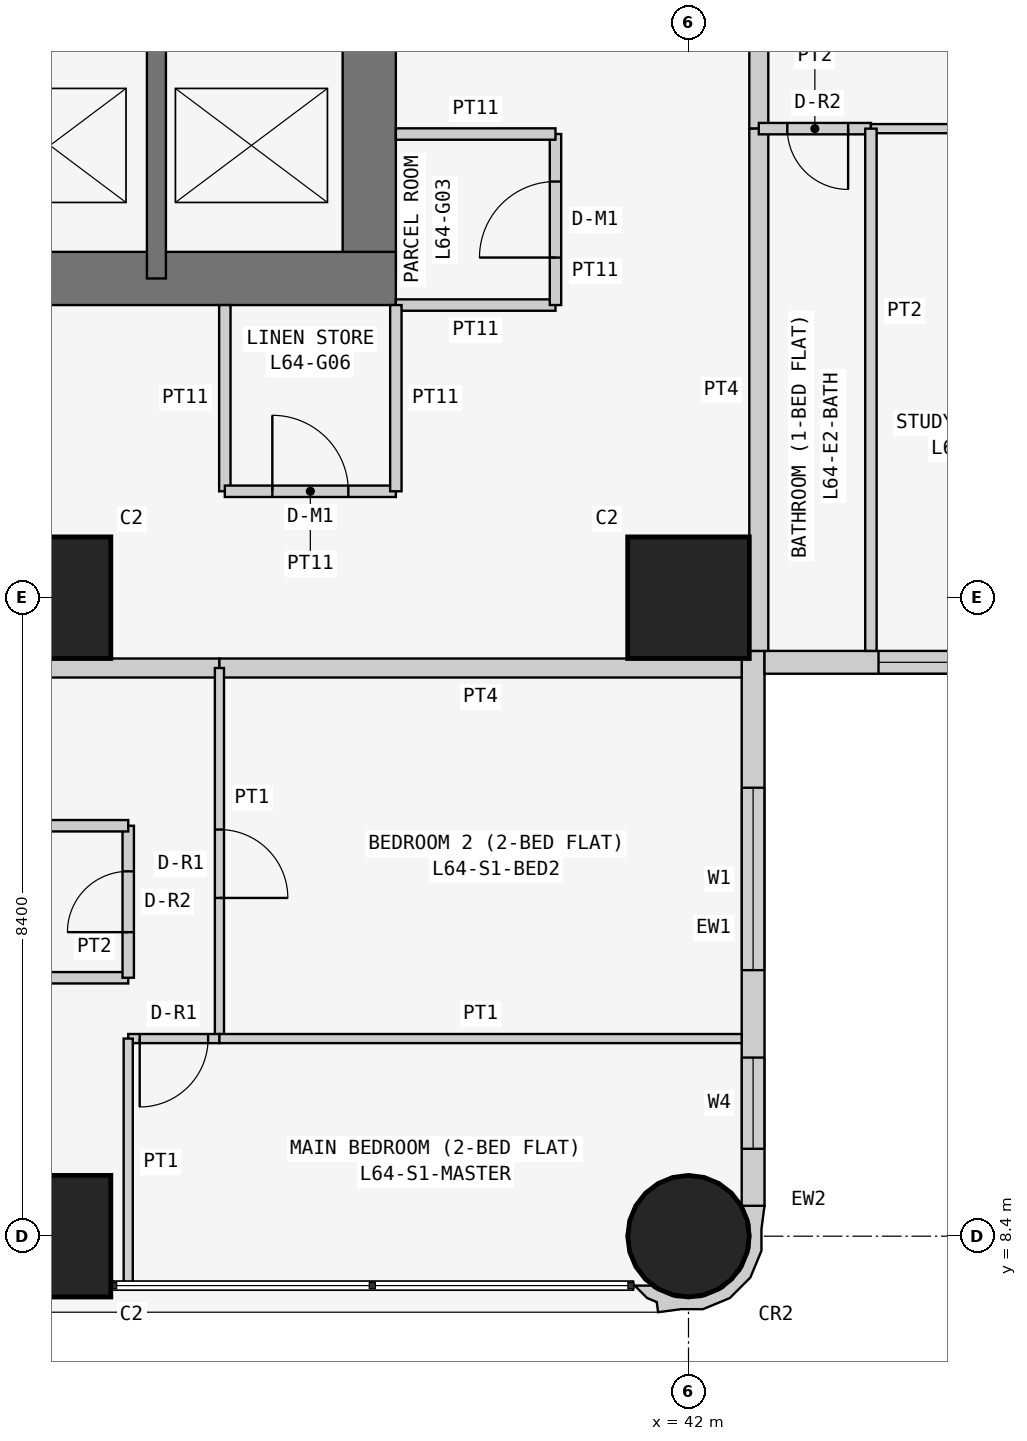
"""IFC4 building model, lengths in metres.
Left out: names, types, materials, properties, quantities, classifications, styles, units other than length and angle.
Written with IfcOpenShell. Run it as: python <this file> out.ifc"""

import sys

from ifc_helpers import new_model, si_unit, direction, frame, frame_2d, origin, origin_2d, place, context, subcontext, project, spatial, polyline, rectangle, circle, outline, extrude, element, fill, save


model = new_model("IFC4")
c1 = context("Model", 3, precision=1e-05, world=origin(), true_north=direction((0.0, 1.0)))
c2 = subcontext(c1, "Body", "Model", "MODEL_VIEW")
j1 = project(units=[si_unit("LENGTHUNIT", "METRE"), si_unit("PLANEANGLEUNIT", "RADIAN")], contexts=[c1])
p1 = place(None, origin())
s1 = spatial("IfcSite", under=j1, at=p1, CompositionType="ELEMENT")
p2 = place(p1, origin())
s2 = spatial("IfcBuilding", under=s1, at=p2, CompositionType="ELEMENT")
p3 = place(p2, frame((0.0, 0.0, 244.5)))
s3 = spatial("IfcBuildingStorey", under=s2, at=p3, CompositionType="ELEMENT", Elevation=244.5)
for number, where, z_axis, x_axis in (
    (1, (33.6, 8.4, 0.0), (0.0, 0.0, 1.0), (1.0, 0.0, 0.0)),
    (2, (33.6, 16.8, 0.0), (0.0, 0.0, 1.0), (1.0, 0.0, 0.0)),
):
    element("IfcColumn", number, at=place(p3, frame(where, z_axis=z_axis, x_axis=x_axis)), inside=s3, PredefinedType="COLUMN", context=c2, shape_type="SweptSolid", body=[
        extrude(rectangle(XDim=1.6, YDim=1.6, at=origin_2d()), origin(), (0.0, 0.0, 1.0), 3.6),
    ])
p4 = place(p3, frame((42.0, 8.4, 0.0), z_axis=(0.0, 0.0, 1.0), x_axis=(1.0, 0.0, 0.0)))
e3 = element("IfcColumn", 3, at=p4, inside=s3, PredefinedType="COLUMN", context=c2, shape_type="SweptSolid", body=[
    extrude(circle(Radius=0.8, at=origin_2d()), origin(), (0.0, 0.0, 1.0), 3.6),
])
p5 = place(p3, frame((42.0, 16.8, 0.0), z_axis=(0.0, 0.0, 1.0), x_axis=(1.0, 0.0, 0.0)))
e4 = element("IfcColumn", 4, at=p5, inside=s3, PredefinedType="COLUMN", context=c2, shape_type="SweptSolid", body=[
    extrude(rectangle(XDim=1.6, YDim=1.6, at=origin_2d()), origin(), (0.0, 0.0, 1.0), 3.6),
])
p6 = place(p3, frame((21.0, 21.0, 0.0), z_axis=(0.0, 0.0, 1.0), x_axis=(1.0, 0.0, 0.0)))
e5 = element("IfcWall", 5, at=p6, inside=s3, PredefinedType="SHEAR", context=c2, shape_type="SweptSolid", body=[
    extrude(rectangle(XDim=17.15, YDim=0.7, at=frame_2d((8.575, 0.0))), origin(), (0.0, 0.0, 1.0), 3.6),
])
p7 = place(p3, frame((37.8, 21.0, 0.0), z_axis=(0.0, 0.0, 1.0), x_axis=(0.0, 1.0, 0.0)))
e6 = element("IfcWall", 6, at=p7, inside=s3, PredefinedType="SHEAR", context=c2, shape_type="SweptSolid", body=[
    extrude(rectangle(XDim=17.15, YDim=0.7, at=frame_2d((8.575, 0.0))), origin(), (0.0, 0.0, 1.0), 3.6),
])
p8 = place(p7, frame((5.2, 0.0, 0.0)))
e7 = element("IfcOpeningElement", 7, at=p8, cuts=e6, PredefinedType="OPENING", context=c2, shape_type="SweptSolid", body=[
    extrude(rectangle(XDim=1.2, YDim=2.1, at=frame_2d((0.6, 1.05))), frame((0.0, 0.36, 0.0), z_axis=(0.0, -1.0, 0.0), x_axis=(1.0, 0.0, 0.0)), (0.0, 0.0, 1.0), 0.72),
])
p9 = place(p3, frame((35.0, 21.0, 0.0), z_axis=(0.0, 0.0, 1.0), x_axis=(0.0, 1.0, 0.0)))
e8 = element("IfcWall", 8, at=p9, inside=s3, PredefinedType="SHEAR", context=c2, shape_type="SweptSolid", body=[
    extrude(rectangle(XDim=3.2, YDim=0.25, at=frame_2d((1.6, 0.0))), origin(), (0.0, 0.0, 1.0), 3.6),
])
p10 = place(p3, frame((42.85, 8.8, 0.0), z_axis=(0.0, 0.0, 1.0), x_axis=(0.0, 1.0, 0.0)))
e9 = element("IfcWall", 9, at=p10, inside=s3, PredefinedType="SOLIDWALL", context=c2, shape_type="SweptSolid", body=[
    extrude(rectangle(XDim=7.3, YDim=0.3, at=frame_2d((3.65, 0.0))), origin(), (0.0, 0.0, 1.0), 3.35),
])
p11 = place(p10, frame((3.1, 0.0, 0.9)))
e10 = element("IfcOpeningElement", 10, at=p11, cuts=e9, PredefinedType="OPENING", context=c2, shape_type="SweptSolid", body=[
    extrude(rectangle(XDim=2.4, YDim=1.5, at=frame_2d((1.2, 0.75))), frame((0.0, 0.16, 0.0), z_axis=(0.0, -1.0, 0.0), x_axis=(1.0, 0.0, 0.0)), (0.0, 0.0, 1.0), 0.32),
])
p12 = place(p10, frame((0.75, 0.0, 0.9)))
e11 = element("IfcOpeningElement", 11, at=p12, cuts=e9, PredefinedType="OPENING", context=c2, shape_type="SweptSolid", body=[
    extrude(rectangle(XDim=1.2, YDim=1.5, at=frame_2d((0.6, 0.75))), frame((0.0, 0.16, 0.0), z_axis=(0.0, -1.0, 0.0), x_axis=(1.0, 0.0, 0.0)), (0.0, 0.0, 1.0), 0.32),
])
p13 = place(p3, frame((43.0, 15.95, 0.0), z_axis=(0.0, 0.0, 1.0), x_axis=(1.0, 0.0, 0.0)))
e12 = element("IfcWall", 12, at=p13, inside=s3, PredefinedType="SOLIDWALL", context=c2, shape_type="SweptSolid", body=[
    extrude(rectangle(XDim=7.0, YDim=0.3, at=frame_2d((3.5, 0.0))), origin(), (0.0, 0.0, 1.0), 3.35),
])
p14 = place(p13, frame((1.5, 0.0, 0.9)))
e13 = element("IfcOpeningElement", 13, at=p14, cuts=e12, PredefinedType="OPENING", context=c2, shape_type="SweptSolid", body=[
    extrude(rectangle(XDim=2.4, YDim=1.5, at=frame_2d((1.2, 0.75))), frame((0.0, 0.16, 0.0), z_axis=(0.0, -1.0, 0.0), x_axis=(1.0, 0.0, 0.0)), (0.0, 0.0, 1.0), 0.32),
])
p15 = place(p13, frame((5.05, 0.0, 0.9)))
e14 = element("IfcOpeningElement", 14, at=p15, cuts=e12, PredefinedType="OPENING", context=c2, shape_type="SweptSolid", body=[
    extrude(rectangle(XDim=1.2, YDim=1.5, at=frame_2d((0.6, 0.75))), frame((0.0, 0.16, 0.0), z_axis=(0.0, -1.0, 0.0), x_axis=(1.0, 0.0, 0.0)), (0.0, 0.0, 1.0), 0.32),
])
p16 = place(p3, frame((41.352, 7.805, 0.0), z_axis=(0.0, 0.0, 1.0), x_axis=(0.343276641956, -0.93923434088, 0.0)))
e15 = element("IfcWall", 15, at=p16, inside=s3, PredefinedType="SOLIDWALL", context=c2, shape_type="SweptSolid", body=[
    extrude(outline(polyline([(-0.369, 1.89), (-0.509, 1.621), (-0.49, 1.615), (-0.479, 1.609), (-0.211, 1.62), (0.088, 1.511), (0.323, 1.295), (0.457, 1.006), (0.47, 0.688), (0.361, 0.389), (0.145, 0.154), (0.108, 0.136), (0.031, -0.075), (0.241, 0.023), (0.333, 0.124), (0.465, 0.094), (0.532, 0.393), (0.631, 0.663), (0.614, 1.044), (0.453, 1.391), (0.172, 1.649), (-0.097, 1.748), (-0.369, 1.89)])), origin(), (0.0, 0.0, 1.0), 3.35),
])
p17 = place(p3, frame((38.15, 20.65, 0.0), z_axis=(0.0, 0.0, 1.0), x_axis=(1.0, 0.0, 0.0)))
e16 = element("IfcWall", 16, at=p17, inside=s3, PredefinedType="PARTITIONING", context=c2, shape_type="SweptSolid", body=[
    extrude(rectangle(XDim=2.1, YDim=0.15, at=frame_2d((1.05, 0.0))), origin(), (0.0, 0.0, 1.0), 3.35),
])
p18 = place(p3, frame((40.25, 20.65, 0.0), z_axis=(0.0, 0.0, 1.0), x_axis=(0.0, 1.0, 0.0)))
e17 = element("IfcWall", 17, at=p18, inside=s3, PredefinedType="PARTITIONING", context=c2, shape_type="SweptSolid", body=[
    extrude(rectangle(XDim=2.25, YDim=0.15, at=frame_2d((1.125, 0.0))), origin(), (0.0, 0.0, 1.0), 3.35),
])
p19 = place(p18, frame((0.625, 0.0, 0.0)))
e18 = element("IfcOpeningElement", 18, at=p19, cuts=e17, PredefinedType="OPENING", context=c2, shape_type="SweptSolid", body=[
    extrude(rectangle(XDim=1.0, YDim=2.1, at=frame_2d((0.5, 1.05))), frame((0.0, 0.085, 0.0), z_axis=(0.0, -1.0, 0.0), x_axis=(1.0, 0.0, 0.0)), (0.0, 0.0, 1.0), 0.17),
])
p20 = place(p3, frame((40.25, 22.9, 0.0), z_axis=(0.0, 0.0, 1.0), x_axis=(-1.0, 0.0, 0.0)))
e19 = element("IfcWall", 19, at=p20, inside=s3, PredefinedType="PARTITIONING", context=c2, shape_type="SweptSolid", body=[
    extrude(rectangle(XDim=2.1, YDim=0.15, at=frame_2d((1.05, 0.0))), origin(), (0.0, 0.0, 1.0), 3.35),
])
p21 = place(p3, frame((35.9, 20.65, 0.0), z_axis=(0.0, 0.0, 1.0), x_axis=(0.0, -1.0, 0.0)))
e20 = element("IfcWall", 20, at=p21, inside=s3, PredefinedType="PARTITIONING", context=c2, shape_type="SweptSolid", body=[
    extrude(rectangle(XDim=2.45, YDim=0.15, at=frame_2d((1.225, 0.0))), origin(), (0.0, 0.0, 1.0), 3.35),
])
p22 = place(p3, frame((35.9, 18.2, 0.0), z_axis=(0.0, 0.0, 1.0), x_axis=(1.0, 0.0, 0.0)))
e21 = element("IfcWall", 21, at=p22, inside=s3, PredefinedType="PARTITIONING", context=c2, shape_type="SweptSolid", body=[
    extrude(rectangle(XDim=2.25, YDim=0.15, at=frame_2d((1.125, 0.0))), origin(), (0.0, 0.0, 1.0), 3.35),
])
p23 = place(p22, frame((0.625, 0.0, 0.0)))
e22 = element("IfcOpeningElement", 22, at=p23, cuts=e21, PredefinedType="OPENING", context=c2, shape_type="SweptSolid", body=[
    extrude(rectangle(XDim=1.0, YDim=2.1, at=frame_2d((0.5, 1.05))), frame((0.0, 0.085, 0.0), z_axis=(0.0, -1.0, 0.0), x_axis=(1.0, 0.0, 0.0)), (0.0, 0.0, 1.0), 0.17),
])
p24 = place(p3, frame((38.15, 18.2, 0.0), z_axis=(0.0, 0.0, 1.0), x_axis=(0.0, 1.0, 0.0)))
e23 = element("IfcWall", 23, at=p24, inside=s3, PredefinedType="PARTITIONING", context=c2, shape_type="SweptSolid", body=[
    extrude(rectangle(XDim=2.45, YDim=0.15, at=frame_2d((1.225, 0.0))), origin(), (0.0, 0.0, 1.0), 3.35),
])
p25 = place(p3, frame((42.925, 29.4, 0.0), z_axis=(0.0, 0.0, 1.0), x_axis=(0.0, -1.0, 0.0)))
e24 = element("IfcWall", 24, at=p25, inside=s3, PredefinedType="PARTITIONING", context=c2, shape_type="SweptSolid", body=[
    extrude(rectangle(XDim=6.429, YDim=0.25, at=frame_2d((3.214, 0.0))), origin(), (0.0, 0.0, 1.0), 3.35),
])
p26 = place(p25, frame((0.5, 0.0, 0.0)))
e25 = element("IfcOpeningElement", 25, at=p26, cuts=e24, PredefinedType="OPENING", context=c2, shape_type="SweptSolid", body=[
    extrude(rectangle(XDim=1.0, YDim=2.1, at=frame_2d((0.5, 1.05))), frame((0.0, 0.135, 0.0), z_axis=(0.0, -1.0, 0.0), x_axis=(1.0, 0.0, 0.0)), (0.0, 0.0, 1.0), 0.27),
])
p27 = place(p3, frame((42.925, 22.971, 0.0), z_axis=(0.0, 0.0, 1.0), x_axis=(0.0, -1.0, 0.0)))
e26 = element("IfcWall", 26, at=p27, inside=s3, PredefinedType="PARTITIONING", context=c2, shape_type="SweptSolid", body=[
    extrude(rectangle(XDim=6.871, YDim=0.25, at=frame_2d((3.436, 0.0))), origin(), (0.0, 0.0, 1.0), 3.35),
])
p28 = place(p3, frame((35.829, 15.875, 0.0), z_axis=(0.0, 0.0, 1.0), x_axis=(-1.0, 0.0, 0.0)))
e27 = element("IfcWall", 27, at=p28, inside=s3, PredefinedType="PARTITIONING", context=c2, shape_type="SweptSolid", body=[
    extrude(rectangle(XDim=6.429, YDim=0.25, at=frame_2d((3.215, 0.0))), origin(), (0.0, 0.0, 1.0), 3.35),
])
p29 = place(p28, frame((4.929, 0.0, 0.0)))
e28 = element("IfcOpeningElement", 28, at=p29, cuts=e27, PredefinedType="OPENING", context=c2, shape_type="SweptSolid", body=[
    extrude(rectangle(XDim=1.0, YDim=2.1, at=frame_2d((0.5, 1.05))), frame((0.0, 0.135, 0.0), z_axis=(0.0, -1.0, 0.0), x_axis=(1.0, 0.0, 0.0)), (0.0, 0.0, 1.0), 0.27),
])
p30 = place(p3, frame((42.7, 15.875, 0.0), z_axis=(0.0, 0.0, 1.0), x_axis=(-1.0, 0.0, 0.0)))
e29 = element("IfcWall", 29, at=p30, inside=s3, PredefinedType="PARTITIONING", context=c2, shape_type="SweptSolid", body=[
    extrude(rectangle(XDim=6.871, YDim=0.25, at=frame_2d((3.436, 0.0))), origin(), (0.0, 0.0, 1.0), 3.35),
])
p31 = place(p3, frame((44.4, 22.971, 0.0), z_axis=(0.0, 0.0, 1.0), x_axis=(-1.0, 0.0, 0.0)))
e30 = element("IfcWall", 30, at=p31, inside=s3, PredefinedType="PARTITIONING", context=c2, shape_type="SweptSolid", body=[
    extrude(rectangle(XDim=1.475, YDim=0.15, at=frame_2d((0.737, 0.0))), origin(), (0.0, 0.0, 1.0), 3.35),
])
p32 = place(p31, frame((0.3, 0.0, 0.0)))
e31 = element("IfcOpeningElement", 31, at=p32, cuts=e30, PredefinedType="OPENING", context=c2, shape_type="SweptSolid", body=[
    extrude(rectangle(XDim=0.8, YDim=2.1, at=frame_2d((0.4, 1.05))), frame((0.0, 0.085, 0.0), z_axis=(0.0, -1.0, 0.0), x_axis=(1.0, 0.0, 0.0)), (0.0, 0.0, 1.0), 0.17),
])
p33 = place(p3, frame((47.8, 22.971, 0.0), z_axis=(0.0, 0.0, 1.0), x_axis=(-1.0, 0.0, 0.0)))
e32 = element("IfcWall", 32, at=p33, inside=s3, PredefinedType="PARTITIONING", context=c2, shape_type="SweptSolid", body=[
    extrude(rectangle(XDim=3.4, YDim=0.12, at=frame_2d((1.7, 0.0))), origin(), (0.0, 0.0, 1.0), 3.35),
])
p34 = place(p33, frame((1.25, 0.0, 0.0)))
e33 = element("IfcOpeningElement", 33, at=p34, cuts=e32, PredefinedType="OPENING", context=c2, shape_type="SweptSolid", body=[
    extrude(rectangle(XDim=0.9, YDim=2.1, at=frame_2d((0.45, 1.05))), frame((0.0, 0.07, 0.0), z_axis=(0.0, -1.0, 0.0), x_axis=(1.0, 0.0, 0.0)), (0.0, 0.0, 1.0), 0.14),
])
p35 = place(p3, frame((44.4, 22.971, 0.0), z_axis=(0.0, 0.0, 1.0), x_axis=(0.0, -1.0, 0.0)))
e34 = element("IfcWall", 34, at=p35, inside=s3, PredefinedType="PARTITIONING", context=c2, shape_type="SweptSolid", body=[
    extrude(rectangle(XDim=6.871, YDim=0.15, at=frame_2d((3.436, 0.0))), origin(), (0.0, 0.0, 1.0), 3.35),
])
p36 = place(p3, frame((29.4, 11.8, 0.0), z_axis=(0.0, 0.0, 1.0), x_axis=(1.0, 0.0, 0.0)))
e35 = element("IfcWall", 35, at=p36, inside=s3, PredefinedType="PARTITIONING", context=c2, shape_type="SweptSolid", body=[
    extrude(rectangle(XDim=5.229, YDim=0.15, at=frame_2d((2.615, 0.0))), origin(), (0.0, 0.0, 1.0), 3.35),
])
p37 = place(p3, frame((34.629, 11.8, 0.0), z_axis=(0.0, 0.0, 1.0), x_axis=(0.0, 1.0, 0.0)))
e36 = element("IfcWall", 36, at=p37, inside=s3, PredefinedType="PARTITIONING", context=c2, shape_type="SweptSolid", body=[
    extrude(rectangle(XDim=2.0, YDim=0.15, at=frame_2d((1.0, 0.0))), origin(), (0.0, 0.0, 1.0), 3.35),
])
p38 = place(p37, frame((0.6, 0.0, 0.0)))
e37 = element("IfcOpeningElement", 37, at=p38, cuts=e36, PredefinedType="OPENING", context=c2, shape_type="SweptSolid", body=[
    extrude(rectangle(XDim=0.8, YDim=2.1, at=frame_2d((0.4, 1.05))), frame((0.0, 0.085, 0.0), z_axis=(0.0, -1.0, 0.0), x_axis=(1.0, 0.0, 0.0)), (0.0, 0.0, 1.0), 0.17),
])
p39 = place(p3, frame((34.629, 13.8, 0.0), z_axis=(0.0, 0.0, 1.0), x_axis=(-1.0, 0.0, 0.0)))
e38 = element("IfcWall", 38, at=p39, inside=s3, PredefinedType="PARTITIONING", context=c2, shape_type="SweptSolid", body=[
    extrude(rectangle(XDim=5.229, YDim=0.15, at=frame_2d((2.615, 0.0))), origin(), (0.0, 0.0, 1.0), 3.35),
])
p40 = place(p3, frame((35.829, 15.875, 0.0), z_axis=(0.0, 0.0, 1.0), x_axis=(0.0, -1.0, 0.0)))
e39 = element("IfcWall", 39, at=p40, inside=s3, PredefinedType="PARTITIONING", context=c2, shape_type="SweptSolid", body=[
    extrude(rectangle(XDim=4.875, YDim=0.12, at=frame_2d((2.438, 0.0))), origin(), (0.0, 0.0, 1.0), 3.35),
])
p41 = place(p40, frame((2.125, 0.0, 0.0)))
e40 = element("IfcOpeningElement", 40, at=p41, cuts=e39, PredefinedType="OPENING", context=c2, shape_type="SweptSolid", body=[
    extrude(rectangle(XDim=0.9, YDim=2.1, at=frame_2d((0.45, 1.05))), frame((0.0, 0.07, 0.0), z_axis=(0.0, -1.0, 0.0), x_axis=(1.0, 0.0, 0.0)), (0.0, 0.0, 1.0), 0.14),
])
p42 = place(p3, frame((35.829, 11.0, 0.0), z_axis=(0.0, 0.0, 1.0), x_axis=(-1.0, 0.0, 0.0)))
e41 = element("IfcWall", 41, at=p42, inside=s3, PredefinedType="PARTITIONING", context=c2, shape_type="SweptSolid", body=[
    extrude(rectangle(XDim=1.2, YDim=0.12, at=frame_2d((0.6, 0.0))), origin(), (0.0, 0.0, 1.0), 3.35),
])
p43 = place(p42, frame((0.149, 0.0, 0.0)))
e42 = element("IfcOpeningElement", 42, at=p43, cuts=e41, PredefinedType="OPENING", context=c2, shape_type="SweptSolid", body=[
    extrude(rectangle(XDim=0.9, YDim=2.1, at=frame_2d((0.45, 1.05))), frame((0.0, 0.07, 0.0), z_axis=(0.0, -1.0, 0.0), x_axis=(1.0, 0.0, 0.0)), (0.0, 0.0, 1.0), 0.14),
])
p44 = place(p3, frame((34.629, 11.0, 0.0), z_axis=(0.0, 0.0, 1.0), x_axis=(0.0, -1.0, 0.0)))
e43 = element("IfcWall", 43, at=p44, inside=s3, PredefinedType="PARTITIONING", context=c2, shape_type="SweptSolid", body=[
    extrude(rectangle(XDim=3.25, YDim=0.12, at=frame_2d((1.625, 0.0))), origin(), (0.0, 0.0, 1.0), 3.35),
])
p45 = place(p3, frame((35.829, 11.0, 0.0), z_axis=(0.0, 0.0, 1.0), x_axis=(1.0, 0.0, 0.0)))
e44 = element("IfcWall", 44, at=p45, inside=s3, PredefinedType="PARTITIONING", context=c2, shape_type="SweptSolid", body=[
    extrude(rectangle(XDim=6.871, YDim=0.12, at=frame_2d((3.436, 0.0))), origin(), (0.0, 0.0, 1.0), 3.35),
])
p46 = place(p14, origin())
e45 = element("IfcWindow", 45, at=p46, inside=s3, PartitioningType="SINGLE_PANEL", PredefinedType="WINDOW", context=c2, shape_type="SweptSolid", body=[
    extrude(rectangle(XDim=2.4, YDim=1.5, at=frame_2d((1.2, 0.75))), frame((0.0, 0.03, 0.0), z_axis=(0.0, -1.0, 0.0), x_axis=(1.0, 0.0, 0.0)), (0.0, 0.0, 1.0), 0.06),
])
fill(e13, e45)
p47 = place(p11, origin())
e46 = element("IfcWindow", 46, at=p47, inside=s3, PartitioningType="SINGLE_PANEL", PredefinedType="WINDOW", context=c2, shape_type="SweptSolid", body=[
    extrude(rectangle(XDim=2.4, YDim=1.5, at=frame_2d((1.2, 0.75))), frame((0.0, 0.03, 0.0), z_axis=(0.0, -1.0, 0.0), x_axis=(1.0, 0.0, 0.0)), (0.0, 0.0, 1.0), 0.06),
])
fill(e10, e46)
p48 = place(p12, origin())
e47 = element("IfcWindow", 47, at=p48, inside=s3, PartitioningType="SINGLE_PANEL", PredefinedType="WINDOW", context=c2, shape_type="SweptSolid", body=[
    extrude(rectangle(XDim=1.2, YDim=1.5, at=frame_2d((0.6, 0.75))), frame((0.0, 0.03, 0.0), z_axis=(0.0, -1.0, 0.0), x_axis=(1.0, 0.0, 0.0)), (0.0, 0.0, 1.0), 0.06),
])
fill(e11, e47)
p49 = place(p19, origin())
e48 = element("IfcDoor", 48, at=p49, inside=s3, OperationType="SINGLE_SWING_LEFT", PredefinedType="DOOR", context=c2, shape_type="SweptSolid", body=[
    extrude(rectangle(XDim=1.0, YDim=2.1, at=frame_2d((0.5, 1.05))), frame((0.0, 0.025, 0.0), z_axis=(0.0, -1.0, 0.0), x_axis=(1.0, 0.0, 0.0)), (0.0, 0.0, 1.0), 0.05),
])
fill(e18, e48)
p50 = place(p23, origin())
e49 = element("IfcDoor", 49, at=p50, inside=s3, OperationType="SINGLE_SWING_LEFT", PredefinedType="DOOR", context=c2, shape_type="SweptSolid", body=[
    extrude(rectangle(XDim=1.0, YDim=2.1, at=frame_2d((0.5, 1.05))), frame((0.0, 0.025, 0.0), z_axis=(0.0, -1.0, 0.0), x_axis=(1.0, 0.0, 0.0)), (0.0, 0.0, 1.0), 0.05),
])
fill(e22, e49)
p51 = place(p32, origin())
e50 = element("IfcDoor", 50, at=p51, inside=s3, OperationType="SINGLE_SWING_LEFT", PredefinedType="DOOR", context=c2, shape_type="SweptSolid", body=[
    extrude(rectangle(XDim=0.8, YDim=2.1, at=frame_2d((0.4, 1.05))), frame((0.0, 0.025, 0.0), z_axis=(0.0, -1.0, 0.0), x_axis=(1.0, 0.0, 0.0)), (0.0, 0.0, 1.0), 0.05),
])
fill(e31, e50)
p52 = place(p38, origin())
e51 = element("IfcDoor", 51, at=p52, inside=s3, OperationType="SINGLE_SWING_LEFT", PredefinedType="DOOR", context=c2, shape_type="SweptSolid", body=[
    extrude(rectangle(XDim=0.8, YDim=2.1, at=frame_2d((0.4, 1.05))), frame((0.0, 0.025, 0.0), z_axis=(0.0, -1.0, 0.0), x_axis=(1.0, 0.0, 0.0)), (0.0, 0.0, 1.0), 0.05),
])
fill(e37, e51)
p53 = place(p41, origin())
e52 = element("IfcDoor", 52, at=p53, inside=s3, OperationType="SINGLE_SWING_RIGHT", PredefinedType="DOOR", context=c2, shape_type="SweptSolid", body=[
    extrude(rectangle(XDim=0.9, YDim=2.1, at=frame_2d((0.45, 1.05))), frame((0.0, 0.025, 0.0), z_axis=(0.0, -1.0, 0.0), x_axis=(1.0, 0.0, 0.0)), (0.0, 0.0, 1.0), 0.05),
])
fill(e40, e52)
p54 = place(p43, origin())
e53 = element("IfcDoor", 53, at=p54, inside=s3, OperationType="SINGLE_SWING_RIGHT", PredefinedType="DOOR", context=c2, shape_type="SweptSolid", body=[
    extrude(rectangle(XDim=0.9, YDim=2.1, at=frame_2d((0.45, 1.05))), frame((0.0, 0.025, 0.0), z_axis=(0.0, -1.0, 0.0), x_axis=(1.0, 0.0, 0.0)), (0.0, 0.0, 1.0), 0.05),
])
fill(e42, e53)
save(model, sys.argv[1])
